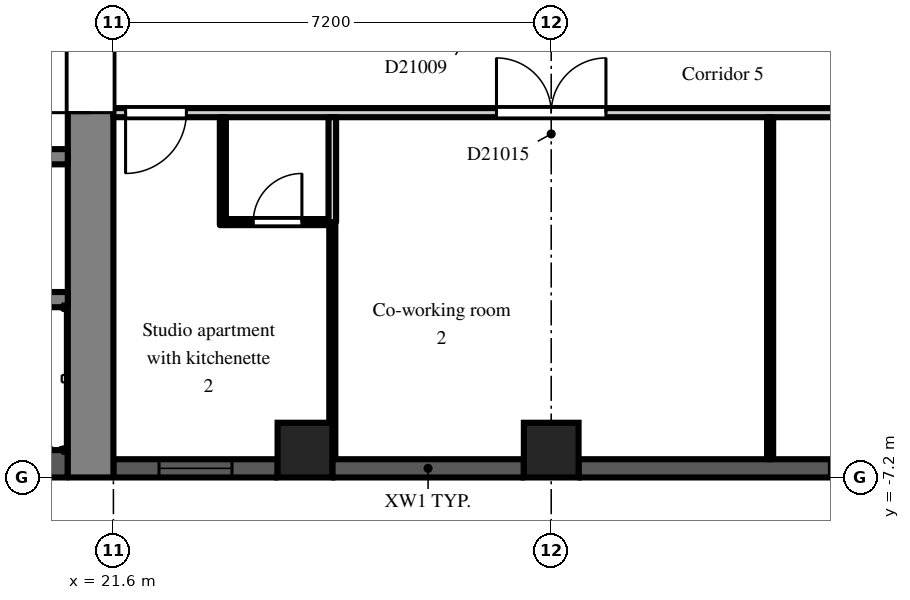
"""IFC4 building model, lengths in metres.
Left out: names, types, materials, properties, quantities, classifications, styles, units other than length and angle.
Written with IfcOpenShell. Run it as: python <this file> out.ifc"""

import sys

from ifc_helpers import new_model, si_unit, direction, frame, frame_2d, origin, origin_2d, place, context, subcontext, project, spatial, rectangle, extrude, element, fill, save


model = new_model("IFC4")
c1 = context("Model", 3, precision=1e-05, world=origin(), true_north=direction((0.0, 1.0)))
c2 = subcontext(c1, "Body", "Model", "MODEL_VIEW")
j1 = project(units=[si_unit("LENGTHUNIT", "METRE"), si_unit("PLANEANGLEUNIT", "RADIAN")], contexts=[c1])
p1 = place(None, origin())
s1 = spatial("IfcSite", under=j1, at=p1, CompositionType="ELEMENT")
p2 = place(p1, origin())
s2 = spatial("IfcBuilding", under=s1, at=p2, CompositionType="ELEMENT")
p3 = place(p2, frame((0.0, 0.0, 147.3)))
s3 = spatial("IfcBuildingStorey", under=s2, at=p3, CompositionType="ELEMENT", Elevation=147.3)
for number, where, z_axis, x_axis in (
    (1, (24.75, -6.75, 0.0), (0.0, 0.0, 1.0), (1.0, 0.0, 0.0)),
    (2, (28.8, -6.75, 0.0), (0.0, 0.0, 1.0), (1.0, 0.0, 0.0)),
):
    element("IfcColumn", number, at=place(p3, frame(where, z_axis=z_axis, x_axis=x_axis)), inside=s3, PredefinedType="COLUMN", context=c2, shape_type="SweptSolid", body=[
        extrude(rectangle(XDim=0.9, YDim=0.9, at=origin_2d()), origin(), (0.0, 0.0, 1.0), 3.0),
    ])
p4 = place(p3, frame((21.6, -7.05, 0.0), z_axis=(0.0, 0.0, 1.0), x_axis=(1.0, 0.0, 0.0)))
e3 = element("IfcWall", 3, at=p4, inside=s3, PredefinedType="SOLIDWALL", context=c2, shape_type="SweptSolid", body=[
    extrude(rectangle(XDim=2.7, YDim=0.3, at=frame_2d((1.35, 0.0))), origin(), (0.0, 0.0, 1.0), 2.2),
])
p5 = place(p4, frame((0.75, 0.0, 0.2)))
e4 = element("IfcOpeningElement", 4, at=p5, cuts=e3, PredefinedType="OPENING", context=c2, shape_type="SweptSolid", body=[
    extrude(rectangle(XDim=1.2, YDim=1.85, at=frame_2d((0.6, 0.925))), frame((0.0, 0.16, 0.0), z_axis=(0.0, -1.0, 0.0), x_axis=(1.0, 0.0, 0.0)), (0.0, 0.0, 1.0), 0.32),
])
p6 = place(p3, frame((25.2, -7.05, 0.0), z_axis=(0.0, 0.0, 1.0), x_axis=(1.0, 0.0, 0.0)))
e5 = element("IfcWall", 5, at=p6, inside=s3, PredefinedType="SOLIDWALL", context=c2, shape_type="SweptSolid", body=[
    extrude(rectangle(XDim=3.15, YDim=0.3, at=frame_2d((1.575, 0.0))), origin(), (0.0, 0.0, 1.0), 2.2),
])
p7 = place(p3, frame((29.25, -7.05, 0.0), z_axis=(0.0, 0.0, 1.0), x_axis=(1.0, 0.0, 0.0)))
e6 = element("IfcWall", 6, at=p7, inside=s3, PredefinedType="SOLIDWALL", context=c2, shape_type="SweptSolid", body=[
    extrude(rectangle(XDim=6.3, YDim=0.3, at=frame_2d((3.15, 0.0))), origin(), (0.0, 0.0, 1.0), 2.2),
])
p8 = place(p7, frame((4.125, 0.0, 0.2)))
e7 = element("IfcOpeningElement", 7, at=p8, cuts=e6, PredefinedType="OPENING", context=c2, shape_type="SweptSolid", body=[
    extrude(rectangle(XDim=1.2, YDim=1.85, at=frame_2d((0.6, 0.925))), frame((0.0, 0.16, 0.0), z_axis=(0.0, -1.0, 0.0), x_axis=(1.0, 0.0, 0.0)), (0.0, 0.0, 1.0), 0.32),
])
p9 = place(p3, frame((21.225, -7.2, 0.0), z_axis=(0.0, 0.0, 1.0), x_axis=(0.0, 1.0, 0.0)))
e8 = element("IfcWall", 8, at=p9, inside=s3, PredefinedType="SHEAR", context=c2, shape_type="SweptSolid", body=[
    extrude(rectangle(XDim=14.4, YDim=0.75, at=frame_2d((7.2, 0.0))), origin(), (0.0, 0.0, 1.0), 2.6),
])
p10 = place(p9, frame((6.0, 0.0, 0.0)))
e9 = element("IfcOpeningElement", 9, at=p10, cuts=e8, PredefinedType="OPENING", context=c2, shape_type="SweptSolid", body=[
    extrude(rectangle(XDim=2.4, YDim=2.2, at=frame_2d((1.2, 1.1))), frame((0.0, 0.385, 0.0), z_axis=(0.0, -1.0, 0.0), x_axis=(1.0, 0.0, 0.0)), (0.0, 0.0, 1.0), 0.77),
])
p11 = place(p3, frame((7.9, -6.975, 0.0), z_axis=(0.0, 0.0, 1.0), x_axis=(1.0, 0.0, 0.0)))
e10 = element("IfcWall", 10, at=p11, inside=s3, PredefinedType="SHEAR", context=c2, shape_type="SweptSolid", body=[
    extrude(rectangle(XDim=12.95, YDim=0.45, at=frame_2d((6.475, 0.0))), origin(), (0.0, 0.0, 1.0), 2.6),
])
p12 = place(p3, frame((7.9, -1.925, 0.0), z_axis=(0.0, 0.0, 1.0), x_axis=(1.0, 0.0, 0.0)))
e11 = element("IfcWall", 11, at=p12, inside=s3, PredefinedType="SHEAR", context=c2, shape_type="SweptSolid", body=[
    extrude(rectangle(XDim=12.95, YDim=0.25, at=frame_2d((6.475, 0.0))), origin(), (0.0, 0.0, 1.0), 2.6),
])
p13 = place(p12, frame((0.525, 0.0, 0.0)))
e12 = element("IfcOpeningElement", 12, at=p13, cuts=e11, PredefinedType="OPENING", context=c2, shape_type="SweptSolid", body=[
    extrude(rectangle(XDim=0.9, YDim=2.1, at=frame_2d((0.45, 1.05))), frame((0.0, 0.135, 0.0), z_axis=(0.0, -1.0, 0.0), x_axis=(1.0, 0.0, 0.0)), (0.0, 0.0, 1.0), 0.27),
])
p14 = place(p12, frame((2.625, 0.0, 0.0)))
e13 = element("IfcOpeningElement", 13, at=p14, cuts=e11, PredefinedType="OPENING", context=c2, shape_type="SweptSolid", body=[
    extrude(rectangle(XDim=1.1, YDim=2.1, at=frame_2d((0.55, 1.05))), frame((0.0, 0.135, 0.0), z_axis=(0.0, -1.0, 0.0), x_axis=(1.0, 0.0, 0.0)), (0.0, 0.0, 1.0), 0.27),
])
p15 = place(p12, frame((4.925, 0.0, 0.0)))
e14 = element("IfcOpeningElement", 14, at=p15, cuts=e11, PredefinedType="OPENING", context=c2, shape_type="SweptSolid", body=[
    extrude(rectangle(XDim=0.9, YDim=2.1, at=frame_2d((0.45, 1.05))), frame((0.0, 0.135, 0.0), z_axis=(0.0, -1.0, 0.0), x_axis=(1.0, 0.0, 0.0)), (0.0, 0.0, 1.0), 0.27),
])
p16 = place(p12, frame((8.225, 0.0, 0.0)))
e15 = element("IfcOpeningElement", 15, at=p16, cuts=e11, PredefinedType="OPENING", context=c2, shape_type="SweptSolid", body=[
    extrude(rectangle(XDim=0.9, YDim=2.1, at=frame_2d((0.45, 1.05))), frame((0.0, 0.135, 0.0), z_axis=(0.0, -1.0, 0.0), x_axis=(1.0, 0.0, 0.0)), (0.0, 0.0, 1.0), 0.27),
])
p17 = place(p12, frame((11.525, 0.0, 0.0)))
e16 = element("IfcOpeningElement", 16, at=p17, cuts=e11, PredefinedType="OPENING", context=c2, shape_type="SweptSolid", body=[
    extrude(rectangle(XDim=0.9, YDim=2.1, at=frame_2d((0.45, 1.05))), frame((0.0, 0.135, 0.0), z_axis=(0.0, -1.0, 0.0), x_axis=(1.0, 0.0, 0.0)), (0.0, 0.0, 1.0), 0.27),
])
p18 = place(p3, frame((12.3, -4.275, 0.0), z_axis=(0.0, 0.0, 1.0), x_axis=(1.0, 0.0, 0.0)))
e17 = element("IfcWall", 17, at=p18, inside=s3, PredefinedType="SHEAR", context=c2, shape_type="SweptSolid", body=[
    extrude(rectangle(XDim=8.55, YDim=0.25, at=frame_2d((4.275, 0.0))), origin(), (0.0, 0.0, 1.0), 2.6),
])
p19 = place(p3, frame((21.6, -1.2, 0.0), z_axis=(0.0, 0.0, 1.0), x_axis=(1.0, 0.0, 0.0)))
e18 = element("IfcWall", 18, at=p19, inside=s3, PredefinedType="PARTITIONING", context=c2, shape_type="SweptSolid", body=[
    extrude(rectangle(XDim=14.9, YDim=0.15, at=frame_2d((7.45, 0.0))), origin(), (0.0, 0.0, 1.0), 2.6),
])
p20 = place(p19, frame((0.2, 0.0, 0.0)))
e19 = element("IfcOpeningElement", 19, at=p20, cuts=e18, PredefinedType="OPENING", context=c2, shape_type="SweptSolid", body=[
    extrude(rectangle(XDim=1.0, YDim=2.1, at=frame_2d((0.5, 1.05))), frame((0.0, 0.085, 0.0), z_axis=(0.0, -1.0, 0.0), x_axis=(1.0, 0.0, 0.0)), (0.0, 0.0, 1.0), 0.17),
])
p21 = place(p19, frame((6.3, 0.0, 0.0)))
e20 = element("IfcOpeningElement", 20, at=p21, cuts=e18, PredefinedType="OPENING", context=c2, shape_type="SweptSolid", body=[
    extrude(rectangle(XDim=1.8, YDim=2.1, at=frame_2d((0.9, 1.05))), frame((0.0, 0.085, 0.0), z_axis=(0.0, -1.0, 0.0), x_axis=(1.0, 0.0, 0.0)), (0.0, 0.0, 1.0), 0.17),
])
p22 = place(p19, frame((11.95, 0.0, 0.0)))
e21 = element("IfcOpeningElement", 21, at=p22, cuts=e18, PredefinedType="OPENING", context=c2, shape_type="SweptSolid", body=[
    extrude(rectangle(XDim=1.8, YDim=2.1, at=frame_2d((0.9, 1.05))), frame((0.0, 0.085, 0.0), z_axis=(0.0, -1.0, 0.0), x_axis=(1.0, 0.0, 0.0)), (0.0, 0.0, 1.0), 0.17),
])
p23 = place(p3, frame((23.4, -3.05, 0.0), z_axis=(0.0, 0.0, 1.0), x_axis=(0.0, 1.0, 0.0)))
e22 = element("IfcWall", 22, at=p23, inside=s3, PredefinedType="PARTITIONING", context=c2, shape_type="SweptSolid", body=[
    extrude(rectangle(XDim=1.775, YDim=0.1, at=frame_2d((0.888, 0.0))), origin(), (0.0, 0.0, 1.0), 2.6),
])
p24 = place(p3, frame((23.45, -3.0, 0.0), z_axis=(0.0, 0.0, 1.0), x_axis=(1.0, 0.0, 0.0)))
e23 = element("IfcWall", 23, at=p24, inside=s3, PredefinedType="PARTITIONING", context=c2, shape_type="SweptSolid", body=[
    extrude(rectangle(XDim=1.688, YDim=0.1, at=frame_2d((0.844, 0.0))), origin(), (0.0, 0.0, 1.0), 2.6),
])
p25 = place(p24, frame((0.45, 0.0, 0.0)))
e24 = element("IfcOpeningElement", 24, at=p25, cuts=e23, PredefinedType="OPENING", context=c2, shape_type="SweptSolid", body=[
    extrude(rectangle(XDim=0.8, YDim=2.1, at=frame_2d((0.4, 1.05))), frame((0.0, 0.06, 0.0), z_axis=(0.0, -1.0, 0.0), x_axis=(1.0, 0.0, 0.0)), (0.0, 0.0, 1.0), 0.12),
])
p26 = place(p3, frame((25.2, -6.9, 0.0), z_axis=(0.0, 0.0, 1.0), x_axis=(0.0, 1.0, 0.0)))
e25 = element("IfcWall", 25, at=p26, inside=s3, PredefinedType="PARTITIONING", context=c2, shape_type="SweptSolid", body=[
    extrude(rectangle(XDim=3.9, YDim=0.1, at=frame_2d((1.95, 0.0))), origin(), (0.0, 0.0, 1.0), 2.6),
])
p27 = place(p3, frame((25.2, -3.0, 0.0), z_axis=(0.0, 0.0, 1.0), x_axis=(0.0, 1.0, 0.0)))
e26 = element("IfcWall", 26, at=p27, inside=s3, PredefinedType="PARTITIONING", context=c2, shape_type="SweptSolid", body=[
    extrude(rectangle(XDim=1.725, YDim=0.125, at=frame_2d((0.863, 0.0))), origin(), (0.0, 0.0, 1.0), 2.6),
])
p28 = place(p3, frame((32.4, -6.9, 0.0), z_axis=(0.0, 0.0, 1.0), x_axis=(0.0, 1.0, 0.0)))
e27 = element("IfcWall", 27, at=p28, inside=s3, PredefinedType="PARTITIONING", context=c2, shape_type="SweptSolid", body=[
    extrude(rectangle(XDim=5.625, YDim=0.1, at=frame_2d((2.812, 0.0))), origin(), (0.0, 0.0, 1.0), 2.6),
])
p29 = place(p5, origin())
e28 = element("IfcWindow", 28, at=p29, inside=s3, PartitioningType="SINGLE_PANEL", PredefinedType="WINDOW", context=c2, shape_type="SweptSolid", body=[
    extrude(rectangle(XDim=1.2, YDim=1.85, at=frame_2d((0.6, 0.925))), frame((0.0, 0.03, 0.0), z_axis=(0.0, -1.0, 0.0), x_axis=(1.0, 0.0, 0.0)), (0.0, 0.0, 1.0), 0.06),
])
fill(e4, e28)
p30 = place(p8, origin())
e29 = element("IfcWindow", 29, at=p30, inside=s3, PartitioningType="SINGLE_PANEL", PredefinedType="WINDOW", context=c2, shape_type="SweptSolid", body=[
    extrude(rectangle(XDim=1.2, YDim=1.85, at=frame_2d((0.6, 0.925))), frame((0.0, 0.03, 0.0), z_axis=(0.0, -1.0, 0.0), x_axis=(1.0, 0.0, 0.0)), (0.0, 0.0, 1.0), 0.06),
])
fill(e7, e29)
p31 = place(p10, origin())
e30 = element("IfcDoor", 30, at=p31, inside=s3, OperationType="DOUBLE_DOOR_DOUBLE_SWING", PredefinedType="DOOR", context=c2, shape_type="SweptSolid", body=[
    extrude(rectangle(XDim=2.4, YDim=2.2, at=frame_2d((1.2, 1.1))), frame((0.0, 0.025, 0.0), z_axis=(0.0, -1.0, 0.0), x_axis=(1.0, 0.0, 0.0)), (0.0, 0.0, 1.0), 0.05),
])
fill(e9, e30)
p32 = place(p25, origin())
e31 = element("IfcDoor", 31, at=p32, inside=s3, OperationType="SINGLE_SWING_RIGHT", PredefinedType="DOOR", context=c2, shape_type="SweptSolid", body=[
    extrude(rectangle(XDim=0.8, YDim=2.1, at=frame_2d((0.4, 1.05))), frame((0.0, 0.025, 0.0), z_axis=(0.0, -1.0, 0.0), x_axis=(1.0, 0.0, 0.0)), (0.0, 0.0, 1.0), 0.05),
])
fill(e24, e31)
p33 = place(p20, frame((1.0, 0.0, 0.0), z_axis=(0.0, 0.0, 1.0), x_axis=(-1.0, 0.0, 0.0)))
e32 = element("IfcDoor", 32, at=p33, inside=s3, OperationType="SINGLE_SWING_RIGHT", PredefinedType="DOOR", context=c2, shape_type="SweptSolid", body=[
    extrude(rectangle(XDim=1.0, YDim=2.1, at=frame_2d((0.5, 1.05))), frame((0.0, 0.025, 0.0), z_axis=(0.0, -1.0, 0.0), x_axis=(1.0, 0.0, 0.0)), (0.0, 0.0, 1.0), 0.05),
])
fill(e19, e32)
p34 = place(p21, origin())
e33 = element("IfcDoor", 33, at=p34, inside=s3, OperationType="DOUBLE_DOOR_DOUBLE_SWING", PredefinedType="DOOR", context=c2, shape_type="SweptSolid", body=[
    extrude(rectangle(XDim=1.8, YDim=2.1, at=frame_2d((0.9, 1.05))), frame((0.0, 0.025, 0.0), z_axis=(0.0, -1.0, 0.0), x_axis=(1.0, 0.0, 0.0)), (0.0, 0.0, 1.0), 0.05),
])
fill(e20, e33)
save(model, sys.argv[1])
